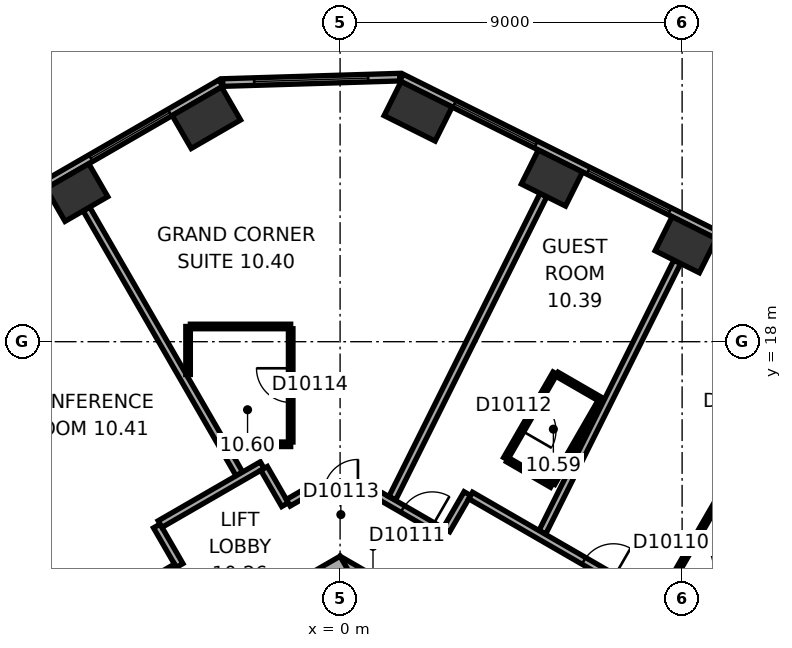
"""IFC4 building model, lengths in metres.
Left out: names, types, materials, properties, quantities, classifications, styles, units other than length and angle.
Written with IfcOpenShell. Run it as: python <this file> out.ifc"""

import sys

from ifc_helpers import new_model, si_unit, direction, frame, frame_2d, origin, origin_2d, place, context, subcontext, project, spatial, rectangle, extrude, element, fill, save


model = new_model("IFC4")
c1 = context("Model", 3, precision=1e-05, world=origin(), true_north=direction((0.0, 1.0)))
c2 = subcontext(c1, "Body", "Model", "MODEL_VIEW")
j1 = project(units=[si_unit("LENGTHUNIT", "METRE"), si_unit("PLANEANGLEUNIT", "RADIAN")], contexts=[c1])
p1 = place(None, origin())
s1 = spatial("IfcSite", under=j1, at=p1, CompositionType="ELEMENT")
p2 = place(p1, origin())
s2 = spatial("IfcBuilding", under=s1, at=p2, CompositionType="ELEMENT")
p3 = place(p2, frame((0.0, 0.0, 53.9)))
s3 = spatial("IfcBuildingStorey", under=s2, at=p3, CompositionType="ELEMENT", Elevation=53.9)
for number, where, z_axis, x_axis in (
    (1, (9.095, 20.551, 0.0), (0.0, 0.0, 1.0), (-0.895, 0.446, 0.0)),
    (2, (5.574, 22.306, 0.0), (0.0, 0.0, 1.0), (-0.895, 0.446, 0.0)),
):
    element("IfcColumn", number, at=place(p3, frame(where, z_axis=z_axis, x_axis=x_axis)), inside=s3, PredefinedType="COLUMN", context=c2, shape_type="SweptSolid", body=[
        extrude(rectangle(XDim=1.3, YDim=1.0, at=origin_2d()), origin(), (0.0, 0.0, 1.0), 3.3),
    ])
for number, where, z_axis, x_axis in (
    (3, (2.053, 24.062, 0.0), (0.0, 0.0, 1.0), (-0.895, 0.446, 0.0)),
    (4, (-3.518, 23.892, 0.0), (0.0, 0.0, 1.0), (-0.866, -0.5, 0.0)),
):
    element("IfcColumn", number, at=place(p3, frame(where, z_axis=z_axis, x_axis=x_axis)), inside=s3, PredefinedType="COLUMN", context=c2, shape_type="SweptSolid", body=[
        extrude(rectangle(XDim=1.5, YDim=1.0, at=origin_2d()), origin(), (0.0, 0.0, 1.0), 3.3),
    ])
p4 = place(p3, frame((-6.926, 21.925, 0.0), z_axis=(0.0, 0.0, 1.0), x_axis=(-0.866025403784, -0.5, 0.0)))
e5 = element("IfcColumn", 5, at=p4, inside=s3, PredefinedType="COLUMN", context=c2, shape_type="SweptSolid", body=[
    extrude(rectangle(XDim=1.3, YDim=1.0, at=origin_2d()), origin(), (0.0, 0.0, 1.0), 3.3),
])
p5 = place(p3, frame((10.4, 5.658, 0.0), z_axis=(0.0, 0.0, 1.0), x_axis=(-0.866021384402, 0.500006961711, 0.0)))
e6 = element("IfcWall", 6, at=p5, inside=s3, PredefinedType="SHEAR", context=c2, shape_type="SweptSolid", body=[
    extrude(rectangle(XDim=12.355, YDim=1.2, at=frame_2d((6.178, 0.0))), origin(), (0.0, 0.0, 1.0), 3.3),
])
p6 = place(p5, frame((2.728, 0.0, 0.0)))
e7 = element("IfcOpeningElement", 7, at=p6, cuts=e6, PredefinedType="OPENING", context=c2, shape_type="SweptSolid", body=[
    extrude(rectangle(XDim=1.1, YDim=2.1, at=frame_2d((0.55, 1.05))), frame((0.0, 0.61, 0.0), z_axis=(0.0, -1.0, 0.0), x_axis=(1.0, 0.0, 0.0)), (0.0, 0.0, 1.0), 1.22),
])
p7 = place(p5, frame((5.328, 0.0, 0.0)))
e8 = element("IfcOpeningElement", 8, at=p7, cuts=e6, PredefinedType="OPENING", context=c2, shape_type="SweptSolid", body=[
    extrude(rectangle(XDim=1.1, YDim=2.1, at=frame_2d((0.55, 1.05))), frame((0.0, 0.61, 0.0), z_axis=(0.0, -1.0, 0.0), x_axis=(1.0, 0.0, 0.0)), (0.0, 0.0, 1.0), 1.22),
])
p8 = place(p5, frame((7.928, 0.0, 0.0)))
e9 = element("IfcOpeningElement", 9, at=p8, cuts=e6, PredefinedType="OPENING", context=c2, shape_type="SweptSolid", body=[
    extrude(rectangle(XDim=1.1, YDim=2.1, at=frame_2d((0.55, 1.05))), frame((0.0, 0.61, 0.0), z_axis=(0.0, -1.0, 0.0), x_axis=(1.0, 0.0, 0.0)), (0.0, 0.0, 1.0), 1.22),
])
p9 = place(p3, frame((0.3, 11.836, 0.0), z_axis=(0.0, 0.0, 1.0), x_axis=(-0.866021384402, -0.500006961711, 0.0)))
e10 = element("IfcWall", 10, at=p9, inside=s3, PredefinedType="SHEAR", context=c2, shape_type="SweptSolid", body=[
    extrude(rectangle(XDim=12.355, YDim=1.2, at=frame_2d((6.178, 0.0))), origin(), (0.0, 0.0, 1.0), 3.3),
])
p10 = place(p9, frame((6.378, 0.0, 0.0)))
e11 = element("IfcOpeningElement", 11, at=p10, cuts=e10, PredefinedType="OPENING", context=c2, shape_type="SweptSolid", body=[
    extrude(rectangle(XDim=1.5, YDim=2.1, at=frame_2d((0.75, 1.05))), frame((0.0, 0.61, 0.0), z_axis=(0.0, -1.0, 0.0), x_axis=(1.0, 0.0, 0.0)), (0.0, 0.0, 1.0), 1.22),
])
p11 = place(p9, frame((1.828, 0.0, 0.0)))
e12 = element("IfcOpeningElement", 12, at=p11, cuts=e10, PredefinedType="OPENING", context=c2, shape_type="SweptSolid", body=[
    extrude(rectangle(XDim=1.1, YDim=2.1, at=frame_2d((0.55, 1.05))), frame((0.0, 0.61, 0.0), z_axis=(0.0, -1.0, 0.0), x_axis=(1.0, 0.0, 0.0)), (0.0, 0.0, 1.0), 1.22),
])
p12 = place(p3, frame((20.63, 15.47, 0.0), z_axis=(0.0, 0.0, 1.0), x_axis=(-0.894934518609, 0.446197498203, 0.0)))
e13 = element("IfcWall", 13, at=p12, inside=s3, PredefinedType="STANDARD", context=c2, shape_type="SweptSolid", body=[
    extrude(rectangle(XDim=21.246, YDim=0.2, at=frame_2d((10.623, 0.0))), origin(), (0.0, 0.0, 1.0), 3.3),
])
p13 = place(p12, frame((1.553, 0.0, 0.8)))
e14 = element("IfcOpeningElement", 14, at=p13, cuts=e13, PredefinedType="OPENING", context=c2, shape_type="SweptSolid", body=[
    extrude(rectangle(XDim=2.4, YDim=1.7, at=frame_2d((1.2, 0.85))), frame((0.0, 0.11, 0.0), z_axis=(0.0, -1.0, 0.0), x_axis=(1.0, 0.0, 0.0)), (0.0, 0.0, 1.0), 0.22),
])
p14 = place(p12, frame((5.488, 0.0, 0.8)))
e15 = element("IfcOpeningElement", 15, at=p14, cuts=e13, PredefinedType="OPENING", context=c2, shape_type="SweptSolid", body=[
    extrude(rectangle(XDim=2.4, YDim=1.7, at=frame_2d((1.2, 0.85))), frame((0.0, 0.11, 0.0), z_axis=(0.0, -1.0, 0.0), x_axis=(1.0, 0.0, 0.0)), (0.0, 0.0, 1.0), 0.22),
])
p15 = place(p12, frame((9.422, 0.0, 0.8)))
e16 = element("IfcOpeningElement", 16, at=p15, cuts=e13, PredefinedType="OPENING", context=c2, shape_type="SweptSolid", body=[
    extrude(rectangle(XDim=2.4, YDim=1.7, at=frame_2d((1.2, 0.85))), frame((0.0, 0.11, 0.0), z_axis=(0.0, -1.0, 0.0), x_axis=(1.0, 0.0, 0.0)), (0.0, 0.0, 1.0), 0.22),
])
p16 = place(p12, frame((13.357, 0.0, 0.8)))
e17 = element("IfcOpeningElement", 17, at=p16, cuts=e13, PredefinedType="OPENING", context=c2, shape_type="SweptSolid", body=[
    extrude(rectangle(XDim=2.4, YDim=1.7, at=frame_2d((1.2, 0.85))), frame((0.0, 0.11, 0.0), z_axis=(0.0, -1.0, 0.0), x_axis=(1.0, 0.0, 0.0)), (0.0, 0.0, 1.0), 0.22),
])
p17 = place(p12, frame((17.292, 0.0, 0.8)))
e18 = element("IfcOpeningElement", 18, at=p17, cuts=e13, PredefinedType="OPENING", context=c2, shape_type="SweptSolid", body=[
    extrude(rectangle(XDim=2.4, YDim=1.7, at=frame_2d((1.2, 0.85))), frame((0.0, 0.11, 0.0), z_axis=(0.0, -1.0, 0.0), x_axis=(1.0, 0.0, 0.0)), (0.0, 0.0, 1.0), 0.22),
])
p18 = place(p3, frame((1.568, 24.961, 0.0), z_axis=(0.0, 0.0, 1.0), x_axis=(-0.999533359013, -0.030546099927, 0.0)))
e19 = element("IfcWall", 19, at=p18, inside=s3, PredefinedType="STANDARD", context=c2, shape_type="SweptSolid", body=[
    extrude(rectangle(XDim=4.66, YDim=0.2, at=frame_2d((2.33, 0.0))), origin(), (0.0, 0.0, 1.0), 3.3),
])
p19 = place(p18, frame((0.83, 0.0, 0.8)))
e20 = element("IfcOpeningElement", 20, at=p19, cuts=e19, PredefinedType="OPENING", context=c2, shape_type="SweptSolid", body=[
    extrude(rectangle(XDim=3.0, YDim=1.7, at=frame_2d((1.5, 0.85))), frame((0.0, 0.11, 0.0), z_axis=(0.0, -1.0, 0.0), x_axis=(1.0, 0.0, 0.0)), (0.0, 0.0, 1.0), 0.22),
])
p20 = place(p3, frame((-3.136, 24.805, 0.0), z_axis=(0.0, 0.0, 1.0), x_axis=(-0.866028291626, -0.499994998079, 0.0)))
e21 = element("IfcWall", 21, at=p20, inside=s3, PredefinedType="STANDARD", context=c2, shape_type="SweptSolid", body=[
    extrude(rectangle(XDim=21.246, YDim=0.2, at=frame_2d((10.623, 0.0))), origin(), (0.0, 0.0, 1.0), 3.3),
])
p21 = place(p20, frame((1.555, 0.0, 0.8)))
e22 = element("IfcOpeningElement", 22, at=p21, cuts=e21, PredefinedType="OPENING", context=c2, shape_type="SweptSolid", body=[
    extrude(rectangle(XDim=2.4, YDim=1.7, at=frame_2d((1.2, 0.85))), frame((0.0, 0.11, 0.0), z_axis=(0.0, -1.0, 0.0), x_axis=(1.0, 0.0, 0.0)), (0.0, 0.0, 1.0), 0.22),
])
p22 = place(p20, frame((5.489, 0.0, 0.8)))
e23 = element("IfcOpeningElement", 23, at=p22, cuts=e21, PredefinedType="OPENING", context=c2, shape_type="SweptSolid", body=[
    extrude(rectangle(XDim=2.4, YDim=1.7, at=frame_2d((1.2, 0.85))), frame((0.0, 0.11, 0.0), z_axis=(0.0, -1.0, 0.0), x_axis=(1.0, 0.0, 0.0)), (0.0, 0.0, 1.0), 0.22),
])
p23 = place(p20, frame((9.424, 0.0, 0.8)))
e24 = element("IfcOpeningElement", 24, at=p23, cuts=e21, PredefinedType="OPENING", context=c2, shape_type="SweptSolid", body=[
    extrude(rectangle(XDim=2.4, YDim=1.7, at=frame_2d((1.2, 0.85))), frame((0.0, 0.11, 0.0), z_axis=(0.0, -1.0, 0.0), x_axis=(1.0, 0.0, 0.0)), (0.0, 0.0, 1.0), 0.22),
])
p24 = place(p20, frame((13.358, 0.0, 0.8)))
e25 = element("IfcOpeningElement", 25, at=p24, cuts=e21, PredefinedType="OPENING", context=c2, shape_type="SweptSolid", body=[
    extrude(rectangle(XDim=2.4, YDim=1.7, at=frame_2d((1.2, 0.85))), frame((0.0, 0.11, 0.0), z_axis=(0.0, -1.0, 0.0), x_axis=(1.0, 0.0, 0.0)), (0.0, 0.0, 1.0), 0.22),
])
p25 = place(p20, frame((17.293, 0.0, 0.8)))
e26 = element("IfcOpeningElement", 26, at=p25, cuts=e21, PredefinedType="OPENING", context=c2, shape_type="SweptSolid", body=[
    extrude(rectangle(XDim=2.4, YDim=1.7, at=frame_2d((1.2, 0.85))), frame((0.0, 0.11, 0.0), z_axis=(0.0, -1.0, 0.0), x_axis=(1.0, 0.0, 0.0)), (0.0, 0.0, 1.0), 0.22),
])
p26 = place(p3, frame((-6.676, 21.492, 0.0), z_axis=(0.0, 0.0, 1.0), x_axis=(0.500011263043, -0.866018900966, 0.0)))
e27 = element("IfcWall", 27, at=p26, inside=s3, PredefinedType="PARTITIONING", context=c2, shape_type="SweptSolid", body=[
    extrude(rectangle(XDim=8.049, YDim=0.2, at=frame_2d((4.024, 0.0))), origin(), (0.0, 0.0, 1.0), 3.05),
])
p27 = place(p3, frame((-4.823, 13.152, 0.0), z_axis=(0.0, 0.0, 1.0), x_axis=(0.499986357472, -0.866033280158, 0.0)))
e28 = element("IfcWall", 28, at=p27, inside=s3, PredefinedType="PARTITIONING", context=c2, shape_type="SweptSolid", body=[
    extrude(rectangle(XDim=1.201, YDim=0.2, at=frame_2d((0.601, 0.0))), origin(), (0.0, 0.0, 1.0), 3.05),
])
p28 = place(p3, frame((-4.309, 12.061, 0.0), z_axis=(0.0, 0.0, 1.0), x_axis=(-0.866020679205, -0.500008183122, 0.0)))
e29 = element("IfcWall", 29, at=p28, inside=s3, PredefinedType="PARTITIONING", context=c2, shape_type="SweptSolid", body=[
    extrude(rectangle(XDim=5.104, YDim=0.2, at=frame_2d((2.552, 0.0))), origin(), (0.0, 0.0, 1.0), 3.05),
])
p29 = place(p28, frame((2.052, 0.0, 0.0)))
e30 = element("IfcOpeningElement", 30, at=p29, cuts=e29, PredefinedType="OPENING", context=c2, shape_type="SweptSolid", body=[
    extrude(rectangle(XDim=1.0, YDim=2.1, at=frame_2d((0.5, 1.05))), frame((0.0, 0.11, 0.0), z_axis=(0.0, -1.0, 0.0), x_axis=(1.0, 0.0, 0.0)), (0.0, 0.0, 1.0), 0.22),
])
p30 = place(p3, frame((-4.0, 17.137, 0.0), z_axis=(0.0, 0.0, 1.0), x_axis=(0.0, 1.0, 0.0)))
e31 = element("IfcWall", 31, at=p30, inside=s3, PredefinedType="PARTITIONING", context=c2, shape_type="SweptSolid", body=[
    extrude(rectangle(XDim=1.263, YDim=0.12, at=frame_2d((0.632, 0.0))), origin(), (0.0, 0.0, 1.0), 3.05),
])
p31 = place(p3, frame((-3.94, 18.401, 0.0), z_axis=(0.0, 0.0, 1.0), x_axis=(1.0, 0.0, 0.0)))
e32 = element("IfcWall", 32, at=p31, inside=s3, PredefinedType="PARTITIONING", context=c2, shape_type="SweptSolid", body=[
    extrude(rectangle(XDim=2.64, YDim=0.12, at=frame_2d((1.32, 0.0))), origin(), (0.0, 0.0, 1.0), 3.05),
])
p32 = place(p3, frame((-2.05, 14.752, 0.0), z_axis=(0.0, 0.0, 1.0), x_axis=(-0.866030936828, -0.499990416364, 0.0)))
e33 = element("IfcWall", 33, at=p32, inside=s3, PredefinedType="PARTITIONING", context=c2, shape_type="SweptSolid", body=[
    extrude(rectangle(XDim=3.102, YDim=0.2, at=frame_2d((1.551, 0.0))), origin(), (0.0, 0.0, 1.0), 3.05),
])
p33 = place(p3, frame((-1.449, 13.712, 0.0), z_axis=(0.0, 0.0, 1.0), x_axis=(-0.499978356969, 0.866037899034, 0.0)))
e34 = element("IfcWall", 34, at=p33, inside=s3, PredefinedType="PARTITIONING", context=c2, shape_type="SweptSolid", body=[
    extrude(rectangle(XDim=1.101, YDim=0.2, at=frame_2d((0.551, 0.0))), origin(), (0.0, 0.0, 1.0), 3.05),
])
p34 = place(p3, frame((-1.3, 15.301, 0.0), z_axis=(0.0, 0.0, 1.0), x_axis=(-1.0, 0.0, 0.0)))
e35 = element("IfcWall", 35, at=p34, inside=s3, PredefinedType="PARTITIONING", context=c2, shape_type="SweptSolid", body=[
    extrude(rectangle(XDim=1.661, YDim=0.12, at=frame_2d((0.831, 0.0))), origin(), (0.0, 0.0, 1.0), 3.05),
])
p35 = place(p3, frame((-1.3, 18.341, 0.0), z_axis=(0.0, 0.0, 1.0), x_axis=(0.0, -1.0, 0.0)))
e36 = element("IfcWall", 36, at=p35, inside=s3, PredefinedType="PARTITIONING", context=c2, shape_type="SweptSolid", body=[
    extrude(rectangle(XDim=2.98, YDim=0.12, at=frame_2d((1.49, 0.0))), origin(), (0.0, 0.0, 1.0), 3.05),
])
p36 = place(p35, frame((1.04, 0.0, 0.0)))
e37 = element("IfcOpeningElement", 37, at=p36, cuts=e36, PredefinedType="OPENING", context=c2, shape_type="SweptSolid", body=[
    extrude(rectangle(XDim=0.9, YDim=2.1, at=frame_2d((0.45, 1.05))), frame((0.0, 0.07, 0.0), z_axis=(0.0, -1.0, 0.0), x_axis=(1.0, 0.0, 0.0)), (0.0, 0.0, 1.0), 0.14),
])
p37 = place(p3, frame((-0.95, 14.001, 0.0), z_axis=(0.0, 0.0, 1.0), x_axis=(-0.86609177584, -0.499885022602, 0.0)))
e38 = element("IfcWall", 38, at=p37, inside=s3, PredefinedType="PARTITIONING", context=c2, shape_type="SweptSolid", body=[
    extrude(rectangle(XDim=0.477, YDim=0.2, at=frame_2d((0.238, 0.0))), origin(), (0.0, 0.0, 1.0), 3.05),
])
p38 = place(p3, frame((0.95, 14.001, 0.0), z_axis=(0.0, 0.0, 1.0), x_axis=(-1.0, 0.0, 0.0)))
e39 = element("IfcWall", 39, at=p38, inside=s3, PredefinedType="PARTITIONING", context=c2, shape_type="SweptSolid", body=[
    extrude(rectangle(XDim=1.86, YDim=0.2, at=frame_2d((0.93, 0.0))), origin(), (0.0, 0.0, 1.0), 3.05),
])
p39 = place(p38, frame((0.48, 0.0, 0.0)))
e40 = element("IfcOpeningElement", 40, at=p39, cuts=e39, PredefinedType="OPENING", context=c2, shape_type="SweptSolid", body=[
    extrude(rectangle(XDim=0.9, YDim=2.1, at=frame_2d((0.45, 1.05))), frame((0.0, 0.11, 0.0), z_axis=(0.0, -1.0, 0.0), x_axis=(1.0, 0.0, 0.0)), (0.0, 0.0, 1.0), 0.22),
])
p40 = place(p3, frame((2.748, 12.962, 0.0), z_axis=(0.0, 0.0, 1.0), x_axis=(-0.866013897511, 0.50001992892, 0.0)))
e41 = element("IfcWall", 41, at=p40, inside=s3, PredefinedType="PARTITIONING", context=c2, shape_type="SweptSolid", body=[
    extrude(rectangle(XDim=2.037, YDim=0.2, at=frame_2d((1.018, 0.0))), origin(), (0.0, 0.0, 1.0), 3.05),
])
p41 = place(p40, frame((0.372, 0.0, 0.0)))
e42 = element("IfcOpeningElement", 42, at=p41, cuts=e41, PredefinedType="OPENING", context=c2, shape_type="SweptSolid", body=[
    extrude(rectangle(XDim=0.9, YDim=2.1, at=frame_2d((0.45, 1.05))), frame((0.0, 0.11, 0.0), z_axis=(0.0, -1.0, 0.0), x_axis=(1.0, 0.0, 0.0)), (0.0, 0.0, 1.0), 0.22),
])
p42 = place(p3, frame((3.349, 14.002, 0.0), z_axis=(0.0, 0.0, 1.0), x_axis=(-0.500074377092, -0.865982457891, 0.0)))
e43 = element("IfcWall", 43, at=p42, inside=s3, PredefinedType="PARTITIONING", context=c2, shape_type="SweptSolid", body=[
    extrude(rectangle(XDim=1.101, YDim=0.2, at=frame_2d((0.55, 0.0))), origin(), (0.0, 0.0, 1.0), 3.05),
])
p43 = place(p3, frame((4.356, 14.922, 0.0), z_axis=(0.0, 0.0, 1.0), x_axis=(0.499936506574, 0.866062058628, 0.0)))
e44 = element("IfcWall", 44, at=p43, inside=s3, PredefinedType="PARTITIONING", context=c2, shape_type="SweptSolid", body=[
    extrude(rectangle(XDim=2.6, YDim=0.12, at=frame_2d((1.3, 0.0))), origin(), (0.0, 0.0, 1.0), 3.05),
])
p44 = place(p43, frame((0.85, 0.0, 0.0)))
e45 = element("IfcOpeningElement", 45, at=p44, cuts=e44, PredefinedType="OPENING", context=c2, shape_type="SweptSolid", body=[
    extrude(rectangle(XDim=0.9, YDim=2.1, at=frame_2d((0.45, 1.05))), frame((0.0, 0.07, 0.0), z_axis=(0.0, -1.0, 0.0), x_axis=(1.0, 0.0, 0.0)), (0.0, 0.0, 1.0), 0.14),
])
p45 = place(p3, frame((5.351, 21.859, 0.0), z_axis=(0.0, 0.0, 1.0), x_axis=(-0.446205309328, -0.894930624086, 0.0)))
e46 = element("IfcWall", 46, at=p45, inside=s3, PredefinedType="PARTITIONING", context=c2, shape_type="SweptSolid", body=[
    extrude(rectangle(XDim=8.913, YDim=0.2, at=frame_2d((4.457, 0.0))), origin(), (0.0, 0.0, 1.0), 2.6),
])
p46 = place(p3, frame((5.569, 14.222, 0.0), z_axis=(0.0, 0.0, 1.0), x_axis=(-0.866036909293, 0.499980071345, 0.0)))
e47 = element("IfcWall", 47, at=p46, inside=s3, PredefinedType="PARTITIONING", context=c2, shape_type="SweptSolid", body=[
    extrude(rectangle(XDim=1.34, YDim=0.12, at=frame_2d((0.67, 0.0))), origin(), (0.0, 0.0, 1.0), 3.05),
])
p47 = place(p3, frame((5.708, 17.144, 0.0), z_axis=(0.0, 0.0, 1.0), x_axis=(0.866082447003, -0.499901185229, 0.0)))
e48 = element("IfcWall", 48, at=p47, inside=s3, PredefinedType="PARTITIONING", context=c2, shape_type="SweptSolid", body=[
    extrude(rectangle(XDim=1.34, YDim=0.12, at=frame_2d((0.67, 0.0))), origin(), (0.0, 0.0, 1.0), 3.05),
])
p48 = place(p3, frame((6.839, 16.422, 0.0), z_axis=(0.0, 0.0, 1.0), x_axis=(-0.50000366821, -0.866023285932, 0.0)))
e49 = element("IfcWall", 49, at=p48, inside=s3, PredefinedType="PARTITIONING", context=c2, shape_type="SweptSolid", body=[
    extrude(rectangle(XDim=2.48, YDim=0.12, at=frame_2d((1.24, 0.0))), origin(), (0.0, 0.0, 1.0), 3.05),
])
p49 = place(p3, frame((8.424, 11.188, 0.0), z_axis=(0.0, 0.0, 1.0), x_axis=(0.49995078051, 0.866053818805, 0.0)))
e50 = element("IfcWall", 50, at=p49, inside=s3, PredefinedType="PARTITIONING", context=c2, shape_type="SweptSolid", body=[
    extrude(rectangle(XDim=2.9, YDim=0.12, at=frame_2d((1.45, 0.0))), origin(), (0.0, 0.0, 1.0), 3.05),
])
p50 = place(p49, frame((1.0, 0.0, 0.0)))
e51 = element("IfcOpeningElement", 51, at=p50, cuts=e50, PredefinedType="OPENING", context=c2, shape_type="SweptSolid", body=[
    extrude(rectangle(XDim=0.9, YDim=2.1, at=frame_2d((0.45, 1.05))), frame((0.0, 0.07, 0.0), z_axis=(0.0, -1.0, 0.0), x_axis=(1.0, 0.0, 0.0)), (0.0, 0.0, 1.0), 0.14),
])
p51 = place(p3, frame((8.872, 20.104, 0.0), z_axis=(0.0, 0.0, 1.0), x_axis=(-0.446218378653, -0.894924107706, 0.0)))
e52 = element("IfcWall", 52, at=p51, inside=s3, PredefinedType="PARTITIONING", context=c2, shape_type="SweptSolid", body=[
    extrude(rectangle(XDim=7.95, YDim=0.2, at=frame_2d((3.975, 0.0))), origin(), (0.0, 0.0, 1.0), 3.05),
])
p52 = place(p3, frame((10.972, 9.602, 0.0), z_axis=(0.0, 0.0, 1.0), x_axis=(-0.866033277307, 0.499986362411, 0.0)))
e53 = element("IfcWall", 53, at=p52, inside=s3, PredefinedType="PARTITIONING", context=c2, shape_type="SweptSolid", body=[
    extrude(rectangle(XDim=8.702, YDim=0.2, at=frame_2d((4.351, 0.0))), origin(), (0.0, 0.0, 1.0), 3.05),
])
p53 = place(p52, frame((4.364, 0.0, 0.0)))
e54 = element("IfcOpeningElement", 54, at=p53, cuts=e53, PredefinedType="OPENING", context=c2, shape_type="SweptSolid", body=[
    extrude(rectangle(XDim=0.9, YDim=2.1, at=frame_2d((0.45, 1.05))), frame((0.0, 0.11, 0.0), z_axis=(0.0, -1.0, 0.0), x_axis=(1.0, 0.0, 0.0)), (0.0, 0.0, 1.0), 0.22),
])
p54 = place(p16, origin())
e55 = element("IfcWindow", 55, at=p54, inside=s3, PartitioningType="SINGLE_PANEL", PredefinedType="WINDOW", context=c2, shape_type="SweptSolid", body=[
    extrude(rectangle(XDim=2.4, YDim=1.7, at=frame_2d((1.2, 0.85))), frame((0.0, 0.03, 0.0), z_axis=(0.0, -1.0, 0.0), x_axis=(1.0, 0.0, 0.0)), (0.0, 0.0, 1.0), 0.06),
])
fill(e17, e55)
p55 = place(p17, origin())
e56 = element("IfcWindow", 56, at=p55, inside=s3, PartitioningType="SINGLE_PANEL", PredefinedType="WINDOW", context=c2, shape_type="SweptSolid", body=[
    extrude(rectangle(XDim=2.4, YDim=1.7, at=frame_2d((1.2, 0.85))), frame((0.0, 0.03, 0.0), z_axis=(0.0, -1.0, 0.0), x_axis=(1.0, 0.0, 0.0)), (0.0, 0.0, 1.0), 0.06),
])
fill(e18, e56)
p56 = place(p19, origin())
e57 = element("IfcWindow", 57, at=p56, inside=s3, PartitioningType="SINGLE_PANEL", PredefinedType="WINDOW", context=c2, shape_type="SweptSolid", body=[
    extrude(rectangle(XDim=3.0, YDim=1.7, at=frame_2d((1.5, 0.85))), frame((0.0, 0.03, 0.0), z_axis=(0.0, -1.0, 0.0), x_axis=(1.0, 0.0, 0.0)), (0.0, 0.0, 1.0), 0.06),
])
fill(e20, e57)
p57 = place(p21, origin())
e58 = element("IfcWindow", 58, at=p57, inside=s3, PartitioningType="SINGLE_PANEL", PredefinedType="WINDOW", context=c2, shape_type="SweptSolid", body=[
    extrude(rectangle(XDim=2.4, YDim=1.7, at=frame_2d((1.2, 0.85))), frame((0.0, 0.03, 0.0), z_axis=(0.0, -1.0, 0.0), x_axis=(1.0, 0.0, 0.0)), (0.0, 0.0, 1.0), 0.06),
])
fill(e22, e58)
p58 = place(p53, origin())
e59 = element("IfcDoor", 59, at=p58, inside=s3, OperationType="SINGLE_SWING_LEFT", PredefinedType="DOOR", context=c2, shape_type="SweptSolid", body=[
    extrude(rectangle(XDim=0.9, YDim=2.1, at=frame_2d((0.45, 1.05))), frame((0.0, 0.025, 0.0), z_axis=(0.0, -1.0, 0.0), x_axis=(1.0, 0.0, 0.0)), (0.0, 0.0, 1.0), 0.05),
])
fill(e54, e59)
p59 = place(p50, origin())
e60 = element("IfcDoor", 60, at=p59, inside=s3, OperationType="SINGLE_SWING_LEFT", PredefinedType="DOOR", context=c2, shape_type="SweptSolid", body=[
    extrude(rectangle(XDim=0.9, YDim=2.1, at=frame_2d((0.45, 1.05))), frame((0.0, 0.025, 0.0), z_axis=(0.0, -1.0, 0.0), x_axis=(1.0, 0.0, 0.0)), (0.0, 0.0, 1.0), 0.05),
])
fill(e51, e60)
p60 = place(p41, origin())
e61 = element("IfcDoor", 61, at=p60, inside=s3, OperationType="SINGLE_SWING_LEFT", PredefinedType="DOOR", context=c2, shape_type="SweptSolid", body=[
    extrude(rectangle(XDim=0.9, YDim=2.1, at=frame_2d((0.45, 1.05))), frame((0.0, 0.025, 0.0), z_axis=(0.0, -1.0, 0.0), x_axis=(1.0, 0.0, 0.0)), (0.0, 0.0, 1.0), 0.05),
])
fill(e42, e61)
p61 = place(p44, origin())
e62 = element("IfcDoor", 62, at=p61, inside=s3, OperationType="SINGLE_SWING_LEFT", PredefinedType="DOOR", context=c2, shape_type="SweptSolid", body=[
    extrude(rectangle(XDim=0.9, YDim=2.1, at=frame_2d((0.45, 1.05))), frame((0.0, 0.025, 0.0), z_axis=(0.0, -1.0, 0.0), x_axis=(1.0, 0.0, 0.0)), (0.0, 0.0, 1.0), 0.05),
])
fill(e45, e62)
p62 = place(p39, origin())
e63 = element("IfcDoor", 63, at=p62, inside=s3, OperationType="SINGLE_SWING_LEFT", PredefinedType="DOOR", context=c2, shape_type="SweptSolid", body=[
    extrude(rectangle(XDim=0.9, YDim=2.1, at=frame_2d((0.45, 1.05))), frame((0.0, 0.025, 0.0), z_axis=(0.0, -1.0, 0.0), x_axis=(1.0, 0.0, 0.0)), (0.0, 0.0, 1.0), 0.05),
])
fill(e40, e63)
p63 = place(p36, origin())
e64 = element("IfcDoor", 64, at=p63, inside=s3, OperationType="SINGLE_SWING_LEFT", PredefinedType="DOOR", context=c2, shape_type="SweptSolid", body=[
    extrude(rectangle(XDim=0.9, YDim=2.1, at=frame_2d((0.45, 1.05))), frame((0.0, 0.025, 0.0), z_axis=(0.0, -1.0, 0.0), x_axis=(1.0, 0.0, 0.0)), (0.0, 0.0, 1.0), 0.05),
])
fill(e37, e64)
save(model, sys.argv[1])
